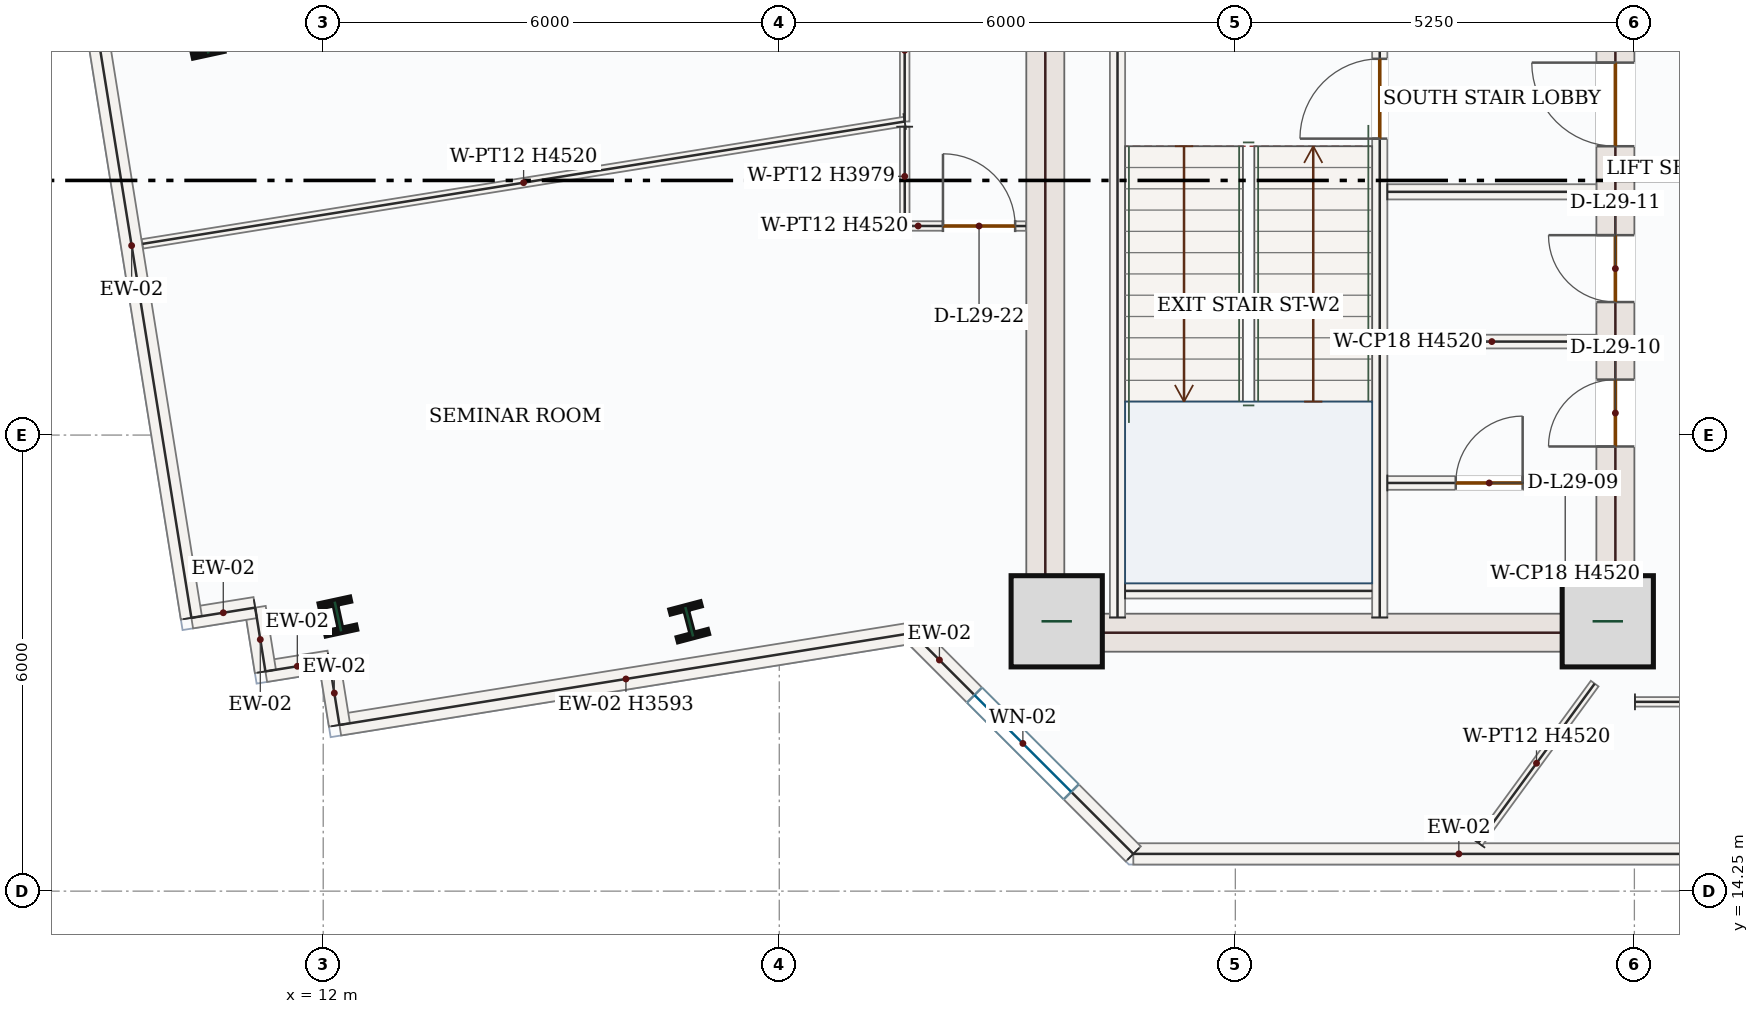
"""IFC4 building model, lengths in metres.
Left out: names, types, materials, properties, quantities, classifications, styles, units other than length and angle.
Written with IfcOpenShell. Run it as: python <this file> out.ifc"""

import sys

from ifc_helpers import new_model, si_unit, direction, frame, frame_2d, origin, origin_2d, place, context, subcontext, project, spatial, rectangle, i_section, extrude, source, transform, mapped, element, fill, save


model = new_model("IFC4")
c1 = context("Model", 3, precision=1e-05, world=origin(), true_north=direction((0.0, 1.0)))
c2 = subcontext(c1, "Body", "Model", "MODEL_VIEW")
j1 = project(units=[si_unit("LENGTHUNIT", "METRE"), si_unit("PLANEANGLEUNIT", "RADIAN")], contexts=[c1])
p1 = place(None, origin())
s1 = spatial("IfcSite", under=j1, at=p1, CompositionType="ELEMENT")
p2 = place(p1, origin())
s2 = spatial("IfcBuilding", under=s1, at=p2, CompositionType="ELEMENT")
p3 = place(p2, frame((0.0, 0.0, 130.8)))
s3 = spatial("IfcBuildingStorey", under=s2, at=p3, CompositionType="ELEMENT", Elevation=130.8)
m1 = source(origin(), c2, "Body", "SweptSolid", [
    extrude(rectangle(XDim=8.55, YDim=0.5, at=frame_2d((4.275, 0.0))), origin(), (0.0, 0.0, 1.0), 4.52),
])
p4 = place(p3, frame((21.5, 17.4, 0.0), z_axis=(0.0, 0.0, 1.0), x_axis=(0.0, 1.0, 0.0)))
e1 = element("IfcWall", 1, at=p4, inside=s3, PredefinedType="SHEAR", context=c2, shape_type="MappedRepresentation", body=[
    mapped(m1, transform((0.0, 0.0, 0.0), x_axis=(1.0, 0.0, 0.0), y_axis=(0.0, 1.0, 0.0), z_axis=(0.0, 0.0, 1.0), scale=1.0)),
])
p5 = place(p3, frame((29.0, 17.4, 0.0), z_axis=(0.0, 0.0, 1.0), x_axis=(0.0, 1.0, 0.0)))
e2 = element("IfcWall", 2, at=p5, inside=s3, PredefinedType="SHEAR", context=c2, shape_type="SweptSolid", body=[
    extrude(rectangle(XDim=8.55, YDim=0.5, at=frame_2d((4.275, 0.0))), origin(), (0.0, 0.0, 1.0), 4.52),
])
p6 = place(p5, frame((6.65, 0.0, 0.0)))
e3 = element("IfcOpeningElement", 3, at=p6, cuts=e2, PredefinedType="OPENING", context=c2, shape_type="SweptSolid", body=[
    extrude(rectangle(XDim=1.1, YDim=2.2, at=frame_2d((0.55, 1.1))), frame((0.0, 0.26, 0.0), z_axis=(0.0, -1.0, 0.0), x_axis=(1.0, 0.0, 0.0)), (0.0, 0.0, 1.0), 0.52),
])
p7 = place(p5, frame((2.7, 0.0, 0.0)))
e4 = element("IfcOpeningElement", 4, at=p7, cuts=e2, PredefinedType="OPENING", context=c2, shape_type="SweptSolid", body=[
    extrude(rectangle(XDim=0.88, YDim=2.1, at=frame_2d((0.44, 1.05))), frame((0.0, 0.26, 0.0), z_axis=(0.0, -1.0, 0.0), x_axis=(1.0, 0.0, 0.0)), (0.0, 0.0, 1.0), 0.52),
])
p8 = place(p5, frame((4.6, 0.0, 0.0)))
e5 = element("IfcOpeningElement", 5, at=p8, cuts=e2, PredefinedType="OPENING", context=c2, shape_type="SweptSolid", body=[
    extrude(rectangle(XDim=0.88, YDim=2.1, at=frame_2d((0.44, 1.05))), frame((0.0, 0.26, 0.0), z_axis=(0.0, -1.0, 0.0), x_axis=(1.0, 0.0, 0.0)), (0.0, 0.0, 1.0), 0.52),
])
m2 = source(origin(), c2, "Body", "SweptSolid", [
    extrude(rectangle(XDim=7.0, YDim=0.5, at=frame_2d((3.5, 0.0))), origin(), (0.0, 0.0, 1.0), 4.52),
])
p9 = place(p3, frame((21.75, 17.65, 0.0), z_axis=(0.0, 0.0, 1.0), x_axis=(1.0, 0.0, 0.0)))
e6 = element("IfcWall", 6, at=p9, inside=s3, PredefinedType="SHEAR", context=c2, shape_type="MappedRepresentation", body=[
    mapped(m2, transform((0.0, 0.0, 0.0), x_axis=(1.0, 0.0, 0.0), y_axis=(0.0, 1.0, 0.0), z_axis=(0.0, 0.0, 1.0), scale=1.0)),
])
m3 = source(origin(), c2, "Body", "SweptSolid", [
    extrude(rectangle(XDim=1.2, YDim=1.2, at=origin_2d()), origin(), (0.0, 0.0, 1.0), 4.8),
])
for number, where, z_axis, x_axis in (
    (7, (21.65, 17.8, 0.0), (0.0, 0.0, 1.0), (1.0, 0.0, 0.0)),
    (8, (28.9, 17.8, 0.0), (0.0, 0.0, 1.0), (1.0, 0.0, 0.0)),
):
    element("IfcColumn", number, at=place(p3, frame(where, z_axis=z_axis, x_axis=x_axis)), inside=s3, PredefinedType="COLUMN", context=c2, shape_type="MappedRepresentation", body=[
        mapped(m3, transform((0.0, 0.0, 0.0), x_axis=(1.0, 0.0, 0.0), y_axis=(0.0, 1.0, 0.0), z_axis=(0.0, 0.0, 1.0), scale=1.0)),
    ])
m4 = source(origin(), c2, "Body", "SweptSolid", [
    extrude(i_section(OverallWidth=0.412, OverallDepth=0.435, WebThickness=0.036, FlangeThickness=0.057, FilletRadius=0.018, at=origin_2d()), origin(), (0.0, 0.0, 1.0), 4.8),
])
for number, where, z_axis, x_axis in (
    (9, (16.815, 17.794, 0.0), (0.0, 0.0, 1.0), (0.967, 0.255, 0.0)),
    (10, (10.447, 25.465, 0.0), (0.0, 0.0, 1.0), (0.977, 0.211, 0.0)),
    (11, (12.193, 17.863, 0.0), (0.0, 0.0, 1.0), (0.977, 0.211, 0.0)),
):
    element("IfcColumn", number, at=place(p3, frame(where, z_axis=z_axis, x_axis=x_axis)), inside=s3, PredefinedType="COLUMN", context=c2, shape_type="MappedRepresentation", body=[
        mapped(m4, transform((0.0, 0.0, 0.0), x_axis=(1.0, 0.0, 0.0), y_axis=(0.0, 1.0, 0.0), z_axis=(0.0, 0.0, 1.0), scale=1.0)),
    ])
m5 = source(origin(), c2, "Body", "SweptSolid", [
    extrude(rectangle(XDim=8.565, YDim=0.28, at=frame_2d((4.282, 0.0))), origin(), (0.0, 0.0, 1.0), 4.52),
])
p10 = place(p3, frame((31.223, 14.74, 0.0), z_axis=(0.0, 0.0, 1.0), x_axis=(-1.0, 0.0, 0.0)))
e12 = element("IfcWall", 12, at=p10, inside=s3, PredefinedType="SOLIDWALL", context=c2, shape_type="MappedRepresentation", body=[
    mapped(m5, transform((0.0, 0.0, 0.0), x_axis=(1.0, 0.0, 0.0), y_axis=(0.0, 1.0, 0.0), z_axis=(0.0, 0.0, 1.0), scale=1.0)),
])
p11 = place(p3, frame((22.658, 14.74, 0.0), z_axis=(0.0, 0.0, 1.0), x_axis=(-0.707106781187, 0.707106781187, 0.0)))
e13 = element("IfcWall", 13, at=p11, inside=s3, PredefinedType="SOLIDWALL", context=c2, shape_type="SweptSolid", body=[
    extrude(rectangle(XDim=4.11, YDim=0.28, at=frame_2d((2.055, 0.0))), origin(), (0.0, 0.0, 1.0), 4.52),
])
p12 = place(p11, frame((1.155, 0.0, 0.85)))
e14 = element("IfcOpeningElement", 14, at=p12, cuts=e13, PredefinedType="OPENING", context=c2, shape_type="SweptSolid", body=[
    extrude(rectangle(XDim=1.8, YDim=1.75, at=frame_2d((0.9, 0.875))), frame((0.0, 0.15, 0.0), z_axis=(0.0, -1.0, 0.0), x_axis=(1.0, 0.0, 0.0)), (0.0, 0.0, 1.0), 0.3),
])
m6 = source(origin(), c2, "Body", "SweptSolid", [
    extrude(rectangle(XDim=7.635, YDim=0.28, at=frame_2d((3.817, 0.0))), origin(), (0.0, 0.0, 1.0), 3.593),
])
p13 = place(p3, frame((19.752, 17.646, 0.0), z_axis=(0.0, 0.0, 1.0), x_axis=(-0.987361485622, -0.158484373712, 0.0)))
e15 = element("IfcWall", 15, at=p13, inside=s3, PredefinedType="SOLIDWALL", context=c2, shape_type="MappedRepresentation", body=[
    mapped(m6, transform((0.0, 0.0, 0.0), x_axis=(1.0, 0.0, 0.0), y_axis=(0.0, 1.0, 0.0), z_axis=(0.0, 0.0, 1.0), scale=1.0)),
])
m7 = source(origin(), c2, "Body", "SweptSolid", [
    extrude(rectangle(XDim=0.85, YDim=0.28, at=frame_2d((0.425, 0.0))), origin(), (0.0, 0.0, 1.0), 4.52),
])
for number, where, z_axis, x_axis in (
    (16, (12.214, 16.436, 0.0), (0.0, 0.0, 1.0), (-0.159, 0.987, 0.0)),
    (17, (12.079, 17.275, 0.0), (0.0, 0.0, 1.0), (-0.987, -0.158, 0.0)),
    (18, (11.24, 17.141, 0.0), (0.0, 0.0, 1.0), (-0.159, 0.987, 0.0)),
):
    element("IfcWall", number, at=place(p3, frame(where, z_axis=z_axis, x_axis=x_axis)), inside=s3, PredefinedType="SOLIDWALL", context=c2, shape_type="MappedRepresentation", body=[
        mapped(m7, transform((0.0, 0.0, 0.0), x_axis=(1.0, 0.0, 0.0), y_axis=(0.0, 1.0, 0.0), z_axis=(0.0, 0.0, 1.0), scale=1.0)),
    ])
m8 = source(origin(), c2, "Body", "SweptSolid", [
    extrude(rectangle(XDim=0.85, YDim=0.28, at=frame_2d((0.425, 0.0))), origin(), (0.0, 0.0, 1.0), 4.52),
])
p14 = place(p3, frame((11.105, 17.98, 0.0), z_axis=(0.0, 0.0, 1.0), x_axis=(-0.987354463376, -0.158528116284, 0.0)))
e19 = element("IfcWall", 19, at=p14, inside=s3, PredefinedType="SOLIDWALL", context=c2, shape_type="MappedRepresentation", body=[
    mapped(m8, transform((0.0, 0.0, 0.0), x_axis=(1.0, 0.0, 0.0), y_axis=(0.0, 1.0, 0.0), z_axis=(0.0, 0.0, 1.0), scale=1.0)),
])
m9 = source(origin(), c2, "Body", "SweptSolid", [
    extrude(rectangle(XDim=9.92, YDim=0.28, at=frame_2d((4.96, 0.0))), origin(), (0.0, 0.0, 1.0), 4.52),
])
p15 = place(p3, frame((10.266, 17.845, 0.0), z_axis=(0.0, 0.0, 1.0), x_axis=(-0.158493446705, 0.987360029246, 0.0)))
e20 = element("IfcWall", 20, at=p15, inside=s3, PredefinedType="SOLIDWALL", context=c2, shape_type="MappedRepresentation", body=[
    mapped(m9, transform((0.0, 0.0, 0.0), x_axis=(1.0, 0.0, 0.0), y_axis=(0.0, 1.0, 0.0), z_axis=(0.0, 0.0, 1.0), scale=1.0)),
])
m10 = source(origin(), c2, "Body", "SweptSolid", [
    extrude(rectangle(XDim=7.87, YDim=0.2, at=frame_2d((3.935, 0.0))), origin(), (0.0, 0.0, 1.0), 4.52),
])
p16 = place(p3, frame((22.45, 17.85, 0.0), z_axis=(0.0, 0.0, 1.0), x_axis=(0.0, 1.0, 0.0)))
e21 = element("IfcWall", 21, at=p16, inside=s3, PredefinedType="SOLIDWALL", context=c2, shape_type="MappedRepresentation", body=[
    mapped(m10, transform((0.0, 0.0, 0.0), x_axis=(1.0, 0.0, 0.0), y_axis=(0.0, 1.0, 0.0), z_axis=(0.0, 0.0, 1.0), scale=1.0)),
])
p17 = place(p3, frame((25.9, 17.85, 0.0), z_axis=(0.0, 0.0, 1.0), x_axis=(0.0, 1.0, 0.0)))
e22 = element("IfcWall", 22, at=p17, inside=s3, PredefinedType="SOLIDWALL", context=c2, shape_type="SweptSolid", body=[
    extrude(rectangle(XDim=8.0, YDim=0.2, at=frame_2d((4.0, 0.0))), origin(), (0.0, 0.0, 1.0), 4.52),
])
p18 = place(p17, frame((6.3, 0.0, 0.0)))
e23 = element("IfcOpeningElement", 23, at=p18, cuts=e22, PredefinedType="OPENING", context=c2, shape_type="SweptSolid", body=[
    extrude(rectangle(XDim=1.05, YDim=2.15, at=frame_2d((0.525, 1.075))), frame((0.0, 0.11, 0.0), z_axis=(0.0, -1.0, 0.0), x_axis=(1.0, 0.0, 0.0)), (0.0, 0.0, 1.0), 0.22),
])
m11 = source(origin(), c2, "Body", "SweptSolid", [
    extrude(rectangle(XDim=3.25, YDim=0.2, at=frame_2d((1.625, 0.0))), origin(), (0.0, 0.0, 1.0), 4.52),
])
p19 = place(p3, frame((22.55, 18.2, 0.0), z_axis=(0.0, 0.0, 1.0), x_axis=(1.0, 0.0, 0.0)))
e24 = element("IfcWall", 24, at=p19, inside=s3, PredefinedType="SOLIDWALL", context=c2, shape_type="MappedRepresentation", body=[
    mapped(m11, transform((0.0, 0.0, 0.0), x_axis=(1.0, 0.0, 0.0), y_axis=(0.0, 1.0, 0.0), z_axis=(0.0, 0.0, 1.0), scale=1.0)),
])
m12 = source(origin(), c2, "Body", "SweptSolid", [
    extrude(rectangle(XDim=2.75, YDim=0.2, at=frame_2d((1.375, 0.0))), origin(), (0.0, 0.0, 1.0), 4.52),
])
p20 = place(p3, frame((26.0, 23.45, 0.0), z_axis=(0.0, 0.0, 1.0), x_axis=(1.0, 0.0, 0.0)))
e25 = element("IfcWall", 25, at=p20, inside=s3, PredefinedType="SOLIDWALL", context=c2, shape_type="MappedRepresentation", body=[
    mapped(m12, transform((0.0, 0.0, 0.0), x_axis=(1.0, 0.0, 0.0), y_axis=(0.0, 1.0, 0.0), z_axis=(0.0, 0.0, 1.0), scale=1.0)),
])
p21 = place(p3, frame((26.0, 19.62, 0.0), z_axis=(0.0, 0.0, 1.0), x_axis=(1.0, 0.0, 0.0)))
e26 = element("IfcWall", 26, at=p21, inside=s3, PredefinedType="PARTITIONING", context=c2, shape_type="SweptSolid", body=[
    extrude(rectangle(XDim=2.75, YDim=0.18, at=frame_2d((1.375, 0.0))), origin(), (0.0, 0.0, 1.0), 4.52),
])
p22 = place(p21, frame((0.9, 0.0, 0.0)))
e27 = element("IfcOpeningElement", 27, at=p22, cuts=e26, PredefinedType="OPENING", context=c2, shape_type="SweptSolid", body=[
    extrude(rectangle(XDim=0.88, YDim=2.1, at=frame_2d((0.44, 1.05))), frame((0.0, 0.1, 0.0), z_axis=(0.0, -1.0, 0.0), x_axis=(1.0, 0.0, 0.0)), (0.0, 0.0, 1.0), 0.2),
])
m13 = source(origin(), c2, "Body", "SweptSolid", [
    extrude(rectangle(XDim=2.75, YDim=0.18, at=frame_2d((1.375, 0.0))), origin(), (0.0, 0.0, 1.0), 4.52),
])
p23 = place(p3, frame((26.0, 21.48, 0.0), z_axis=(0.0, 0.0, 1.0), x_axis=(1.0, 0.0, 0.0)))
e28 = element("IfcWall", 28, at=p23, inside=s3, PredefinedType="PARTITIONING", context=c2, shape_type="MappedRepresentation", body=[
    mapped(m13, transform((0.0, 0.0, 0.0), x_axis=(1.0, 0.0, 0.0), y_axis=(0.0, 1.0, 0.0), z_axis=(0.0, 0.0, 1.0), scale=1.0)),
])
p24 = place(p3, frame((29.258, 16.74, 0.0), z_axis=(0.0, 0.0, 1.0), x_axis=(0.999999999577, -2.9101068e-05, 0.0)))
e29 = element("IfcWall", 29, at=p24, inside=s3, PredefinedType="PARTITIONING", context=c2, shape_type="SweptSolid", body=[
    extrude(rectangle(XDim=8.389, YDim=0.125, at=frame_2d((4.195, 0.0))), origin(), (0.0, 0.0, 1.0), 4.52),
])
p25 = place(p24, frame((5.803, 0.0, 0.0)))
e30 = element("IfcOpeningElement", 30, at=p25, cuts=e29, PredefinedType="OPENING", context=c2, shape_type="SweptSolid", body=[
    extrude(rectangle(XDim=0.95, YDim=2.15, at=frame_2d((0.475, 1.075))), frame((0.0, 0.073, 0.0), z_axis=(0.0, -1.0, 0.0), x_axis=(1.0, 0.0, 0.0)), (0.0, 0.0, 1.0), 0.145),
])
m14 = source(origin(), c2, "Body", "SweptSolid", [
    extrude(rectangle(XDim=2.594, YDim=0.125, at=frame_2d((1.297, 0.0))), origin(), (0.0, 0.0, 1.0), 4.52),
])
p26 = place(p3, frame((27.197, 14.885, 0.0), z_axis=(0.0, 0.0, 1.0), x_axis=(0.589910415932, 0.807468699811, 0.0)))
e31 = element("IfcWall", 31, at=p26, inside=s3, PredefinedType="PARTITIONING", context=c2, shape_type="MappedRepresentation", body=[
    mapped(m14, transform((0.0, 0.0, 0.0), x_axis=(1.0, 0.0, 0.0), y_axis=(0.0, 1.0, 0.0), z_axis=(0.0, 0.0, 1.0), scale=1.0)),
])
m15 = source(origin(), c2, "Body", "SweptSolid", [
    extrude(rectangle(XDim=1.874, YDim=0.125, at=frame_2d((0.937, 0.0))), origin(), (0.0, 0.0, 1.0), 3.593),
])
p27 = place(p3, frame((19.65, 26.249, 0.0), z_axis=(0.0, 0.0, 1.0), x_axis=(0.0, -1.0, 0.0)))
e32 = element("IfcWall", 32, at=p27, inside=s3, PredefinedType="PARTITIONING", context=c2, shape_type="MappedRepresentation", body=[
    mapped(m15, transform((0.0, 0.0, 0.0), x_axis=(1.0, 0.0, 0.0), y_axis=(0.0, 1.0, 0.0), z_axis=(0.0, 0.0, 1.0), scale=1.0)),
])
m16 = source(origin(), c2, "Body", "SweptSolid", [
    extrude(rectangle(XDim=10.156, YDim=0.125, at=frame_2d((5.078, 0.0))), origin(), (0.0, 0.0, 1.0), 4.52),
])
p28 = place(p3, frame((19.65, 24.375, 0.0), z_axis=(0.0, 0.0, 1.0), x_axis=(-0.987359342163, -0.158497726933, 0.0)))
e33 = element("IfcWall", 33, at=p28, inside=s3, PredefinedType="PARTITIONING", context=c2, shape_type="MappedRepresentation", body=[
    mapped(m16, transform((0.0, 0.0, 0.0), x_axis=(1.0, 0.0, 0.0), y_axis=(0.0, 1.0, 0.0), z_axis=(0.0, 0.0, 1.0), scale=1.0)),
])
m17 = source(origin(), c2, "Body", "SweptSolid", [
    extrude(rectangle(XDim=1.306, YDim=0.125, at=frame_2d((0.653, 0.0))), origin(), (0.0, 0.0, 1.0), 3.979),
])
p29 = place(p3, frame((19.65, 24.307, 0.0), z_axis=(0.0, 0.0, 1.0), x_axis=(0.000747803119, -0.999999720395, 0.0)))
e34 = element("IfcWall", 34, at=p29, inside=s3, PredefinedType="PARTITIONING", context=c2, shape_type="MappedRepresentation", body=[
    mapped(m17, transform((0.0, 0.0, 0.0), x_axis=(1.0, 0.0, 0.0), y_axis=(0.0, 1.0, 0.0), z_axis=(0.0, 0.0, 1.0), scale=1.0)),
])
p30 = place(p3, frame((19.651, 23.001, 0.0), z_axis=(0.0, 0.0, 1.0), x_axis=(0.999999812387, -0.000612557312, 0.0)))
e35 = element("IfcWall", 35, at=p30, inside=s3, PredefinedType="PARTITIONING", context=c2, shape_type="SweptSolid", body=[
    extrude(rectangle(XDim=1.594, YDim=0.125, at=frame_2d((0.797, 0.0))), origin(), (0.0, 0.0, 1.0), 4.52),
])
p31 = place(p30, frame((0.502, 0.0, 0.0)))
e36 = element("IfcOpeningElement", 36, at=p31, cuts=e35, PredefinedType="OPENING", context=c2, shape_type="SweptSolid", body=[
    extrude(rectangle(XDim=0.95, YDim=2.15, at=frame_2d((0.475, 1.075))), frame((0.0, 0.073, 0.0), z_axis=(0.0, -1.0, 0.0), x_axis=(1.0, 0.0, 0.0)), (0.0, 0.0, 1.0), 0.145),
])
m18 = source(origin(), c2, "Body", "SweptSolid", [
    extrude(rectangle(XDim=1.8, YDim=1.75, at=frame_2d((0.9, 0.875))), frame((0.0, 0.03, 0.0), z_axis=(0.0, -1.0, 0.0), x_axis=(1.0, 0.0, 0.0)), (0.0, 0.0, 1.0), 0.06),
])
p32 = place(p12, origin())
e37 = element("IfcWindow", 37, at=p32, inside=s3, PartitioningType="DOUBLE_PANEL_VERTICAL", PredefinedType="WINDOW", context=c2, shape_type="MappedRepresentation", body=[
    mapped(m18, transform((0.0, 0.0, 0.0), x_axis=(1.0, 0.0, 0.0), y_axis=(0.0, 1.0, 0.0), z_axis=(0.0, 0.0, 1.0), scale=1.0)),
])
fill(e14, e37)
m19 = source(origin(), c2, "Body", "SweptSolid", [
    extrude(rectangle(XDim=1.05, YDim=2.15, at=frame_2d((0.525, 1.075))), frame((0.0, 0.025, 0.0), z_axis=(0.0, -1.0, 0.0), x_axis=(1.0, 0.0, 0.0)), (0.0, 0.0, 1.0), 0.05),
])
p33 = place(p18, origin())
e38 = element("IfcDoor", 38, at=p33, inside=s3, OperationType="SINGLE_SWING_LEFT", PredefinedType="DOOR", context=c2, shape_type="MappedRepresentation", body=[
    mapped(m19, transform((0.0, 0.0, 0.0), x_axis=(1.0, 0.0, 0.0), y_axis=(0.0, 1.0, 0.0), z_axis=(0.0, 0.0, 1.0), scale=1.0)),
])
fill(e23, e38)
m20 = source(origin(), c2, "Body", "SweptSolid", [
    extrude(rectangle(XDim=1.1, YDim=2.2, at=frame_2d((0.55, 1.1))), frame((0.0, 0.025, 0.0), z_axis=(0.0, -1.0, 0.0), x_axis=(1.0, 0.0, 0.0)), (0.0, 0.0, 1.0), 0.05),
])
p34 = place(p6, origin())
e39 = element("IfcDoor", 39, at=p34, inside=s3, OperationType="SINGLE_SWING_RIGHT", PredefinedType="DOOR", context=c2, shape_type="MappedRepresentation", body=[
    mapped(m20, transform((0.0, 0.0, 0.0), x_axis=(1.0, 0.0, 0.0), y_axis=(0.0, 1.0, 0.0), z_axis=(0.0, 0.0, 1.0), scale=1.0)),
])
fill(e3, e39)
m21 = source(origin(), c2, "Body", "SweptSolid", [
    extrude(rectangle(XDim=0.88, YDim=2.1, at=frame_2d((0.44, 1.05))), frame((0.0, 0.025, 0.0), z_axis=(0.0, -1.0, 0.0), x_axis=(1.0, 0.0, 0.0)), (0.0, 0.0, 1.0), 0.05),
])
p35 = place(p22, origin())
e40 = element("IfcDoor", 40, at=p35, inside=s3, OperationType="SINGLE_SWING_RIGHT", PredefinedType="DOOR", context=c2, shape_type="MappedRepresentation", body=[
    mapped(m21, transform((0.0, 0.0, 0.0), x_axis=(1.0, 0.0, 0.0), y_axis=(0.0, 1.0, 0.0), z_axis=(0.0, 0.0, 1.0), scale=1.0)),
])
fill(e27, e40)
p36 = place(p7, origin())
e41 = element("IfcDoor", 41, at=p36, inside=s3, OperationType="SINGLE_SWING_LEFT", PredefinedType="DOOR", context=c2, shape_type="MappedRepresentation", body=[
    mapped(m21, transform((0.0, 0.0, 0.0), x_axis=(1.0, 0.0, 0.0), y_axis=(0.0, 1.0, 0.0), z_axis=(0.0, 0.0, 1.0), scale=1.0)),
])
fill(e4, e41)
p37 = place(p8, origin())
e42 = element("IfcDoor", 42, at=p37, inside=s3, OperationType="SINGLE_SWING_RIGHT", PredefinedType="DOOR", context=c2, shape_type="MappedRepresentation", body=[
    mapped(m21, transform((0.0, 0.0, 0.0), x_axis=(1.0, 0.0, 0.0), y_axis=(0.0, 1.0, 0.0), z_axis=(0.0, 0.0, 1.0), scale=1.0)),
])
fill(e5, e42)
m22 = source(origin(), c2, "Body", "SweptSolid", [
    extrude(rectangle(XDim=0.95, YDim=2.15, at=frame_2d((0.475, 1.075))), frame((0.0, 0.025, 0.0), z_axis=(0.0, -1.0, 0.0), x_axis=(1.0, 0.0, 0.0)), (0.0, 0.0, 1.0), 0.05),
])
p38 = place(p31, origin())
e43 = element("IfcDoor", 43, at=p38, inside=s3, OperationType="SINGLE_SWING_LEFT", PredefinedType="DOOR", context=c2, shape_type="MappedRepresentation", body=[
    mapped(m22, transform((0.0, 0.0, 0.0), x_axis=(1.0, 0.0, 0.0), y_axis=(0.0, 1.0, 0.0), z_axis=(0.0, 0.0, 1.0), scale=1.0)),
])
fill(e36, e43)
save(model, sys.argv[1])
